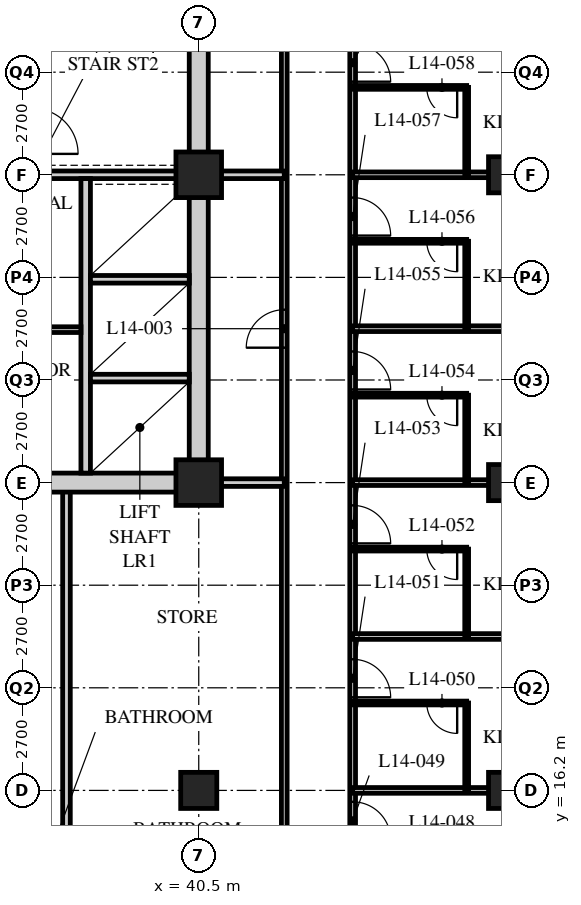
"""IFC4 building model, lengths in metres.
Left out: names, types, materials, properties, quantities, classifications, styles, units other than length and angle.
Written with IfcOpenShell. Run it as: python <this file> out.ifc"""

import sys

from ifc_helpers import new_model, si_unit, direction, frame, frame_2d, origin, origin_2d, place, context, subcontext, project, spatial, rectangle, hollow_rectangle, extrude, element, fill, save


model = new_model("IFC4")
c1 = context("Model", 3, precision=1e-05, world=origin(), true_north=direction((0.0, 1.0)))
c2 = subcontext(c1, "Body", "Model", "MODEL_VIEW")
j1 = project(units=[si_unit("LENGTHUNIT", "METRE"), si_unit("PLANEANGLEUNIT", "RADIAN")], contexts=[c1])
p1 = place(None, origin())
s1 = spatial("IfcSite", under=j1, at=p1, CompositionType="ELEMENT")
p2 = place(p1, origin())
s2 = spatial("IfcBuilding", under=s1, at=p2, CompositionType="ELEMENT")
p3 = place(p2, frame((0.0, 0.0, 60.2)))
s3 = spatial("IfcBuildingStorey", under=s2, at=p3, CompositionType="ELEMENT", Elevation=60.2)
p4 = place(p3, frame((40.5, 16.2, 0.0), z_axis=(0.0, 0.0, 1.0), x_axis=(1.0, 0.0, 0.0)))
e1 = element("IfcColumn", 1, at=p4, inside=s3, PredefinedType="COLUMN", context=c2, shape_type="SweptSolid", body=[
    extrude(hollow_rectangle(XDim=0.95, YDim=0.95, WallThickness=0.095, at=origin_2d()), origin(), (0.0, 0.0, 1.0), 3.4),
])
for number, where, z_axis, x_axis in (
    (2, (40.5, 24.3, 0.0), (0.0, 0.0, 1.0), (1.0, 0.0, 0.0)),
    (3, (40.5, 32.4, 0.0), (0.0, 0.0, 1.0), (1.0, 0.0, 0.0)),
):
    element("IfcColumn", number, at=place(p3, frame(where, z_axis=z_axis, x_axis=x_axis)), inside=s3, PredefinedType="COLUMN", context=c2, shape_type="SweptSolid", body=[
        extrude(hollow_rectangle(XDim=1.2, YDim=1.2, WallThickness=0.12, at=origin_2d()), origin(), (0.0, 0.0, 1.0), 3.4),
    ])
for number, where, z_axis, x_axis in (
    (4, (48.6, 16.2, 0.0), (0.0, 0.0, 1.0), (1.0, 0.0, 0.0)),
    (5, (48.6, 24.3, 0.0), (0.0, 0.0, 1.0), (1.0, 0.0, 0.0)),
    (6, (48.6, 32.4, 0.0), (0.0, 0.0, 1.0), (1.0, 0.0, 0.0)),
):
    element("IfcColumn", number, at=place(p3, frame(where, z_axis=z_axis, x_axis=x_axis)), inside=s3, PredefinedType="COLUMN", context=c2, shape_type="SweptSolid", body=[
        extrude(hollow_rectangle(XDim=0.95, YDim=0.95, WallThickness=0.095, at=origin_2d()), origin(), (0.0, 0.0, 1.0), 3.4),
    ])
p5 = place(p3, frame((44.55, 12.15, 0.0), z_axis=(0.0, 0.0, 1.0), x_axis=(0.0, 1.0, 0.0)))
e7 = element("IfcWall", 7, at=p5, inside=s3, PredefinedType="PARTITIONING", context=c2, shape_type="SweptSolid", body=[
    extrude(rectangle(XDim=30.15, YDim=0.15, at=frame_2d((15.075, 0.0))), origin(), (0.0, 0.0, 1.0), 3.19),
])
p6 = place(p5, frame((2.75, 0.0, 0.0)))
e8 = element("IfcOpeningElement", 8, at=p6, cuts=e7, PredefinedType="OPENING", context=c2, shape_type="SweptSolid", body=[
    extrude(rectangle(XDim=1.0, YDim=2.1, at=frame_2d((0.5, 1.05))), frame((0.0, 0.085, 0.0), z_axis=(0.0, -1.0, 0.0), x_axis=(1.0, 0.0, 0.0)), (0.0, 0.0, 1.0), 0.17),
])
p7 = place(p5, frame((6.5, 0.0, 0.0)))
e9 = element("IfcOpeningElement", 9, at=p7, cuts=e7, PredefinedType="OPENING", context=c2, shape_type="SweptSolid", body=[
    extrude(rectangle(XDim=1.0, YDim=2.1, at=frame_2d((0.5, 1.05))), frame((0.0, 0.085, 0.0), z_axis=(0.0, -1.0, 0.0), x_axis=(1.0, 0.0, 0.0)), (0.0, 0.0, 1.0), 0.17),
])
p8 = place(p5, frame((10.55, 0.0, 0.0)))
e10 = element("IfcOpeningElement", 10, at=p8, cuts=e7, PredefinedType="OPENING", context=c2, shape_type="SweptSolid", body=[
    extrude(rectangle(XDim=1.0, YDim=2.1, at=frame_2d((0.5, 1.05))), frame((0.0, 0.085, 0.0), z_axis=(0.0, -1.0, 0.0), x_axis=(1.0, 0.0, 0.0)), (0.0, 0.0, 1.0), 0.17),
])
p9 = place(p5, frame((14.6, 0.0, 0.0)))
e11 = element("IfcOpeningElement", 11, at=p9, cuts=e7, PredefinedType="OPENING", context=c2, shape_type="SweptSolid", body=[
    extrude(rectangle(XDim=1.0, YDim=2.1, at=frame_2d((0.5, 1.05))), frame((0.0, 0.085, 0.0), z_axis=(0.0, -1.0, 0.0), x_axis=(1.0, 0.0, 0.0)), (0.0, 0.0, 1.0), 0.17),
])
p10 = place(p5, frame((18.65, 0.0, 0.0)))
e12 = element("IfcOpeningElement", 12, at=p10, cuts=e7, PredefinedType="OPENING", context=c2, shape_type="SweptSolid", body=[
    extrude(rectangle(XDim=1.0, YDim=2.1, at=frame_2d((0.5, 1.05))), frame((0.0, 0.085, 0.0), z_axis=(0.0, -1.0, 0.0), x_axis=(1.0, 0.0, 0.0)), (0.0, 0.0, 1.0), 0.17),
])
p11 = place(p5, frame((22.7, 0.0, 0.0)))
e13 = element("IfcOpeningElement", 13, at=p11, cuts=e7, PredefinedType="OPENING", context=c2, shape_type="SweptSolid", body=[
    extrude(rectangle(XDim=1.0, YDim=2.1, at=frame_2d((0.5, 1.05))), frame((0.0, 0.085, 0.0), z_axis=(0.0, -1.0, 0.0), x_axis=(1.0, 0.0, 0.0)), (0.0, 0.0, 1.0), 0.17),
])
p12 = place(p5, frame((26.7, 0.0, 0.0)))
e14 = element("IfcOpeningElement", 14, at=p12, cuts=e7, PredefinedType="OPENING", context=c2, shape_type="SweptSolid", body=[
    extrude(rectangle(XDim=1.0, YDim=2.1, at=frame_2d((0.5, 1.05))), frame((0.0, 0.085, 0.0), z_axis=(0.0, -1.0, 0.0), x_axis=(1.0, 0.0, 0.0)), (0.0, 0.0, 1.0), 0.17),
])
p13 = place(p3, frame((42.75, 13.95, 0.0), z_axis=(0.0, 0.0, 1.0), x_axis=(0.0, 1.0, 0.0)))
e15 = element("IfcWall", 15, at=p13, inside=s3, PredefinedType="PARTITIONING", context=c2, shape_type="SweptSolid", body=[
    extrude(rectangle(XDim=26.55, YDim=0.15, at=frame_2d((13.275, 0.0))), origin(), (0.0, 0.0, 1.0), 3.19),
])
p14 = place(p13, frame((13.9, 0.0, 0.0)))
e16 = element("IfcOpeningElement", 16, at=p14, cuts=e15, PredefinedType="OPENING", context=c2, shape_type="SweptSolid", body=[
    extrude(rectangle(XDim=1.0, YDim=2.1, at=frame_2d((0.5, 1.05))), frame((0.0, 0.085, 0.0), z_axis=(0.0, -1.0, 0.0), x_axis=(1.0, 0.0, 0.0)), (0.0, 0.0, 1.0), 0.17),
])
p15 = place(p13, frame((22.0, 0.0, 0.0)))
e17 = element("IfcOpeningElement", 17, at=p15, cuts=e15, PredefinedType="OPENING", context=c2, shape_type="SweptSolid", body=[
    extrude(rectangle(XDim=1.0, YDim=2.1, at=frame_2d((0.5, 1.05))), frame((0.0, 0.085, 0.0), z_axis=(0.0, -1.0, 0.0), x_axis=(1.0, 0.0, 0.0)), (0.0, 0.0, 1.0), 0.17),
])
p16 = place(p3, frame((40.5, 32.4, 0.0), z_axis=(0.0, 0.0, 1.0), x_axis=(1.0, 0.0, 0.0)))
e18 = element("IfcWall", 18, at=p16, inside=s3, PredefinedType="SOLIDWALL", context=c2, shape_type="SweptSolid", body=[
    extrude(rectangle(XDim=2.25, YDim=0.2, at=frame_2d((1.125, 0.0))), origin(), (0.0, 0.0, 1.0), 2.578),
])
p17 = place(p3, frame((37.02, 13.95, 0.0), z_axis=(0.0, 0.0, 1.0), x_axis=(0.0, 1.0, 0.0)))
e19 = element("IfcWall", 19, at=p17, inside=s3, PredefinedType="SOLIDWALL", context=c2, shape_type="SweptSolid", body=[
    extrude(rectangle(XDim=10.35, YDim=0.2, at=frame_2d((5.175, 0.0))), origin(), (0.0, 0.0, 1.0), 3.19),
])
p18 = place(p3, frame((40.5, 24.3, 0.0), z_axis=(0.0, 0.0, 1.0), x_axis=(1.0, 0.0, 0.0)))
e20 = element("IfcWall", 20, at=p18, inside=s3, PredefinedType="SOLIDWALL", context=c2, shape_type="SweptSolid", body=[
    extrude(rectangle(XDim=2.25, YDim=0.2, at=frame_2d((1.125, 0.0))), origin(), (0.0, 0.0, 1.0), 2.578),
])
p19 = place(p3, frame((44.55, 16.2, 0.0), z_axis=(0.0, 0.0, 1.0), x_axis=(1.0, 0.0, 0.0)))
e21 = element("IfcWall", 21, at=p19, inside=s3, PredefinedType="PARTITIONING", context=c2, shape_type="SweptSolid", body=[
    extrude(rectangle(XDim=11.85, YDim=0.15, at=frame_2d((5.925, 0.0))), origin(), (0.0, 0.0, 1.0), 2.578),
])
p20 = place(p3, frame((47.55, 16.2, 0.0), z_axis=(0.0, 0.0, 1.0), x_axis=(0.0, 1.0, 0.0)))
e22 = element("IfcWall", 22, at=p20, inside=s3, PredefinedType="PARTITIONING", context=c2, shape_type="SweptSolid", body=[
    extrude(rectangle(XDim=2.3, YDim=0.1, at=frame_2d((1.15, 0.0))), origin(), (0.0, 0.0, 1.0), 3.19),
])
p21 = place(p3, frame((44.55, 18.5, 0.0), z_axis=(0.0, 0.0, 1.0), x_axis=(1.0, 0.0, 0.0)))
e23 = element("IfcWall", 23, at=p21, inside=s3, PredefinedType="PARTITIONING", context=c2, shape_type="SweptSolid", body=[
    extrude(rectangle(XDim=3.0, YDim=0.1, at=frame_2d((1.5, 0.0))), origin(), (0.0, 0.0, 1.0), 3.19),
])
p22 = place(p21, frame((1.95, 0.0, 0.0)))
e24 = element("IfcOpeningElement", 24, at=p22, cuts=e23, PredefinedType="OPENING", context=c2, shape_type="SweptSolid", body=[
    extrude(rectangle(XDim=0.8, YDim=2.1, at=frame_2d((0.4, 1.05))), frame((0.0, 0.06, 0.0), z_axis=(0.0, -1.0, 0.0), x_axis=(1.0, 0.0, 0.0)), (0.0, 0.0, 1.0), 0.12),
])
p23 = place(p3, frame((44.55, 20.25, 0.0), z_axis=(0.0, 0.0, 1.0), x_axis=(1.0, 0.0, 0.0)))
e25 = element("IfcWall", 25, at=p23, inside=s3, PredefinedType="PARTITIONING", context=c2, shape_type="SweptSolid", body=[
    extrude(rectangle(XDim=11.85, YDim=0.15, at=frame_2d((5.925, 0.0))), origin(), (0.0, 0.0, 1.0), 3.19),
])
p24 = place(p3, frame((47.55, 20.25, 0.0), z_axis=(0.0, 0.0, 1.0), x_axis=(0.0, 1.0, 0.0)))
e26 = element("IfcWall", 26, at=p24, inside=s3, PredefinedType="PARTITIONING", context=c2, shape_type="SweptSolid", body=[
    extrude(rectangle(XDim=2.3, YDim=0.1, at=frame_2d((1.15, 0.0))), origin(), (0.0, 0.0, 1.0), 3.19),
])
p25 = place(p3, frame((44.55, 22.55, 0.0), z_axis=(0.0, 0.0, 1.0), x_axis=(1.0, 0.0, 0.0)))
e27 = element("IfcWall", 27, at=p25, inside=s3, PredefinedType="PARTITIONING", context=c2, shape_type="SweptSolid", body=[
    extrude(rectangle(XDim=3.0, YDim=0.1, at=frame_2d((1.5, 0.0))), origin(), (0.0, 0.0, 1.0), 3.19),
])
p26 = place(p25, frame((1.95, 0.0, 0.0)))
e28 = element("IfcOpeningElement", 28, at=p26, cuts=e27, PredefinedType="OPENING", context=c2, shape_type="SweptSolid", body=[
    extrude(rectangle(XDim=0.8, YDim=2.1, at=frame_2d((0.4, 1.05))), frame((0.0, 0.06, 0.0), z_axis=(0.0, -1.0, 0.0), x_axis=(1.0, 0.0, 0.0)), (0.0, 0.0, 1.0), 0.12),
])
p27 = place(p3, frame((44.55, 24.3, 0.0), z_axis=(0.0, 0.0, 1.0), x_axis=(1.0, 0.0, 0.0)))
e29 = element("IfcWall", 29, at=p27, inside=s3, PredefinedType="PARTITIONING", context=c2, shape_type="SweptSolid", body=[
    extrude(rectangle(XDim=11.85, YDim=0.15, at=frame_2d((5.925, 0.0))), origin(), (0.0, 0.0, 1.0), 2.578),
])
p28 = place(p3, frame((47.55, 24.3, 0.0), z_axis=(0.0, 0.0, 1.0), x_axis=(0.0, 1.0, 0.0)))
e30 = element("IfcWall", 30, at=p28, inside=s3, PredefinedType="PARTITIONING", context=c2, shape_type="SweptSolid", body=[
    extrude(rectangle(XDim=2.3, YDim=0.1, at=frame_2d((1.15, 0.0))), origin(), (0.0, 0.0, 1.0), 3.19),
])
p29 = place(p3, frame((44.55, 26.6, 0.0), z_axis=(0.0, 0.0, 1.0), x_axis=(1.0, 0.0, 0.0)))
e31 = element("IfcWall", 31, at=p29, inside=s3, PredefinedType="PARTITIONING", context=c2, shape_type="SweptSolid", body=[
    extrude(rectangle(XDim=3.0, YDim=0.1, at=frame_2d((1.5, 0.0))), origin(), (0.0, 0.0, 1.0), 3.19),
])
p30 = place(p29, frame((1.95, 0.0, 0.0)))
e32 = element("IfcOpeningElement", 32, at=p30, cuts=e31, PredefinedType="OPENING", context=c2, shape_type="SweptSolid", body=[
    extrude(rectangle(XDim=0.8, YDim=2.1, at=frame_2d((0.4, 1.05))), frame((0.0, 0.06, 0.0), z_axis=(0.0, -1.0, 0.0), x_axis=(1.0, 0.0, 0.0)), (0.0, 0.0, 1.0), 0.12),
])
p31 = place(p3, frame((44.55, 28.35, 0.0), z_axis=(0.0, 0.0, 1.0), x_axis=(1.0, 0.0, 0.0)))
e33 = element("IfcWall", 33, at=p31, inside=s3, PredefinedType="PARTITIONING", context=c2, shape_type="SweptSolid", body=[
    extrude(rectangle(XDim=11.85, YDim=0.15, at=frame_2d((5.925, 0.0))), origin(), (0.0, 0.0, 1.0), 3.19),
])
p32 = place(p3, frame((47.55, 28.35, 0.0), z_axis=(0.0, 0.0, 1.0), x_axis=(0.0, 1.0, 0.0)))
e34 = element("IfcWall", 34, at=p32, inside=s3, PredefinedType="PARTITIONING", context=c2, shape_type="SweptSolid", body=[
    extrude(rectangle(XDim=2.3, YDim=0.1, at=frame_2d((1.15, 0.0))), origin(), (0.0, 0.0, 1.0), 3.19),
])
p33 = place(p3, frame((44.55, 30.65, 0.0), z_axis=(0.0, 0.0, 1.0), x_axis=(1.0, 0.0, 0.0)))
e35 = element("IfcWall", 35, at=p33, inside=s3, PredefinedType="PARTITIONING", context=c2, shape_type="SweptSolid", body=[
    extrude(rectangle(XDim=3.0, YDim=0.1, at=frame_2d((1.5, 0.0))), origin(), (0.0, 0.0, 1.0), 3.19),
])
p34 = place(p33, frame((1.95, 0.0, 0.0)))
e36 = element("IfcOpeningElement", 36, at=p34, cuts=e35, PredefinedType="OPENING", context=c2, shape_type="SweptSolid", body=[
    extrude(rectangle(XDim=0.8, YDim=2.1, at=frame_2d((0.4, 1.05))), frame((0.0, 0.06, 0.0), z_axis=(0.0, -1.0, 0.0), x_axis=(1.0, 0.0, 0.0)), (0.0, 0.0, 1.0), 0.12),
])
p35 = place(p3, frame((44.55, 32.4, 0.0), z_axis=(0.0, 0.0, 1.0), x_axis=(1.0, 0.0, 0.0)))
e37 = element("IfcWall", 37, at=p35, inside=s3, PredefinedType="PARTITIONING", context=c2, shape_type="SweptSolid", body=[
    extrude(rectangle(XDim=11.85, YDim=0.15, at=frame_2d((5.925, 0.0))), origin(), (0.0, 0.0, 1.0), 2.578),
])
p36 = place(p3, frame((47.55, 32.4, 0.0), z_axis=(0.0, 0.0, 1.0), x_axis=(0.0, 1.0, 0.0)))
e38 = element("IfcWall", 38, at=p36, inside=s3, PredefinedType="PARTITIONING", context=c2, shape_type="SweptSolid", body=[
    extrude(rectangle(XDim=2.3, YDim=0.1, at=frame_2d((1.15, 0.0))), origin(), (0.0, 0.0, 1.0), 3.19),
])
p37 = place(p3, frame((44.55, 34.7, 0.0), z_axis=(0.0, 0.0, 1.0), x_axis=(1.0, 0.0, 0.0)))
e39 = element("IfcWall", 39, at=p37, inside=s3, PredefinedType="PARTITIONING", context=c2, shape_type="SweptSolid", body=[
    extrude(rectangle(XDim=3.0, YDim=0.1, at=frame_2d((1.5, 0.0))), origin(), (0.0, 0.0, 1.0), 3.19),
])
p38 = place(p37, frame((1.95, 0.0, 0.0)))
e40 = element("IfcOpeningElement", 40, at=p38, cuts=e39, PredefinedType="OPENING", context=c2, shape_type="SweptSolid", body=[
    extrude(rectangle(XDim=0.8, YDim=2.1, at=frame_2d((0.4, 1.05))), frame((0.0, 0.06, 0.0), z_axis=(0.0, -1.0, 0.0), x_axis=(1.0, 0.0, 0.0)), (0.0, 0.0, 1.0), 0.12),
])
p39 = place(p3, frame((15.95, 24.3, 0.0), z_axis=(0.0, 0.0, 1.0), x_axis=(1.0, 0.0, 0.0)))
e41 = element("IfcWall", 41, at=p39, inside=s3, PredefinedType="SOLIDWALL", context=c2, shape_type="SweptSolid", body=[
    extrude(rectangle(XDim=24.8, YDim=0.5, at=frame_2d((12.4, 0.0))), origin(), (0.0, 0.0, 1.0), 2.54),
])
p40 = place(p39, frame((11.5, 0.0, 0.0)))
e42 = element("IfcOpeningElement", 42, at=p40, cuts=e41, PredefinedType="OPENING", context=c2, shape_type="SweptSolid", body=[
    extrude(rectangle(XDim=1.8, YDim=2.4, at=frame_2d((0.9, 1.2))), frame((0.0, 0.26, 0.0), z_axis=(0.0, -1.0, 0.0), x_axis=(1.0, 0.0, 0.0)), (0.0, 0.0, 1.0), 0.52),
])
p41 = place(p3, frame((40.5, 24.55, 0.0), z_axis=(0.0, 0.0, 1.0), x_axis=(0.0, 1.0, 0.0)))
e43 = element("IfcWall", 43, at=p41, inside=s3, PredefinedType="SOLIDWALL", context=c2, shape_type="SweptSolid", body=[
    extrude(rectangle(XDim=15.7, YDim=0.5, at=frame_2d((7.85, 0.0))), origin(), (0.0, 0.0, 1.0), 2.578),
])
p42 = place(p3, frame((32.3, 32.4, 0.0), z_axis=(0.0, 0.0, 1.0), x_axis=(1.0, 0.0, 0.0)))
e44 = element("IfcWall", 44, at=p42, inside=s3, PredefinedType="SOLIDWALL", context=c2, shape_type="SweptSolid", body=[
    extrude(rectangle(XDim=7.95, YDim=0.2, at=frame_2d((3.975, 0.0))), origin(), (0.0, 0.0, 1.0), 2.578),
])
p43 = place(p3, frame((37.525, 24.55, 0.0), z_axis=(0.0, 0.0, 1.0), x_axis=(0.0, 1.0, 0.0)))
e45 = element("IfcWall", 45, at=p43, inside=s3, PredefinedType="SOLIDWALL", context=c2, shape_type="SweptSolid", body=[
    extrude(rectangle(XDim=7.75, YDim=0.25, at=frame_2d((3.875, 0.0))), origin(), (0.0, 0.0, 1.0), 3.19),
])
for number, where, z_axis, x_axis in (
    (46, (37.65, 27.05, 0.0), (0.0, 0.0, 1.0), (1.0, 0.0, 0.0)),
    (47, (37.65, 29.65, 0.0), (0.0, 0.0, 1.0), (1.0, 0.0, 0.0)),
):
    element("IfcWall", number, at=place(p3, frame(where, z_axis=z_axis, x_axis=x_axis)), inside=s3, PredefinedType="SOLIDWALL", context=c2, shape_type="SweptSolid", body=[
        extrude(rectangle(XDim=2.6, YDim=0.2, at=frame_2d((1.3, 0.0))), origin(), (0.0, 0.0, 1.0), 3.19),
    ])
p44 = place(p3, frame((32.5, 28.325, 0.0), z_axis=(0.0, 0.0, 1.0), x_axis=(1.0, 0.0, 0.0)))
e48 = element("IfcWall", 48, at=p44, inside=s3, PredefinedType="PARTITIONING", context=c2, shape_type="SweptSolid", body=[
    extrude(rectangle(XDim=4.9, YDim=0.15, at=frame_2d((2.45, 0.0))), origin(), (0.0, 0.0, 1.0), 3.19),
])
p45 = place(p14, origin())
e49 = element("IfcDoor", 49, at=p45, inside=s3, OperationType="SINGLE_SWING_LEFT", PredefinedType="DOOR", context=c2, shape_type="SweptSolid", body=[
    extrude(rectangle(XDim=1.0, YDim=2.1, at=frame_2d((0.5, 1.05))), frame((0.0, 0.025, 0.0), z_axis=(0.0, -1.0, 0.0), x_axis=(1.0, 0.0, 0.0)), (0.0, 0.0, 1.0), 0.05),
])
fill(e16, e49)
p46 = place(p6, origin())
e50 = element("IfcDoor", 50, at=p46, inside=s3, OperationType="SINGLE_SWING_RIGHT", PredefinedType="DOOR", context=c2, shape_type="SweptSolid", body=[
    extrude(rectangle(XDim=1.0, YDim=2.1, at=frame_2d((0.5, 1.05))), frame((0.0, 0.025, 0.0), z_axis=(0.0, -1.0, 0.0), x_axis=(1.0, 0.0, 0.0)), (0.0, 0.0, 1.0), 0.05),
])
fill(e8, e50)
p47 = place(p22, origin())
e51 = element("IfcDoor", 51, at=p47, inside=s3, OperationType="SINGLE_SWING_LEFT", PredefinedType="DOOR", context=c2, shape_type="SweptSolid", body=[
    extrude(rectangle(XDim=0.8, YDim=2.1, at=frame_2d((0.4, 1.05))), frame((0.0, 0.025, 0.0), z_axis=(0.0, -1.0, 0.0), x_axis=(1.0, 0.0, 0.0)), (0.0, 0.0, 1.0), 0.05),
])
fill(e24, e51)
p48 = place(p7, origin())
e52 = element("IfcDoor", 52, at=p48, inside=s3, OperationType="SINGLE_SWING_RIGHT", PredefinedType="DOOR", context=c2, shape_type="SweptSolid", body=[
    extrude(rectangle(XDim=1.0, YDim=2.1, at=frame_2d((0.5, 1.05))), frame((0.0, 0.025, 0.0), z_axis=(0.0, -1.0, 0.0), x_axis=(1.0, 0.0, 0.0)), (0.0, 0.0, 1.0), 0.05),
])
fill(e9, e52)
p49 = place(p26, origin())
e53 = element("IfcDoor", 53, at=p49, inside=s3, OperationType="SINGLE_SWING_LEFT", PredefinedType="DOOR", context=c2, shape_type="SweptSolid", body=[
    extrude(rectangle(XDim=0.8, YDim=2.1, at=frame_2d((0.4, 1.05))), frame((0.0, 0.025, 0.0), z_axis=(0.0, -1.0, 0.0), x_axis=(1.0, 0.0, 0.0)), (0.0, 0.0, 1.0), 0.05),
])
fill(e28, e53)
p50 = place(p8, origin())
e54 = element("IfcDoor", 54, at=p50, inside=s3, OperationType="SINGLE_SWING_RIGHT", PredefinedType="DOOR", context=c2, shape_type="SweptSolid", body=[
    extrude(rectangle(XDim=1.0, YDim=2.1, at=frame_2d((0.5, 1.05))), frame((0.0, 0.025, 0.0), z_axis=(0.0, -1.0, 0.0), x_axis=(1.0, 0.0, 0.0)), (0.0, 0.0, 1.0), 0.05),
])
fill(e10, e54)
p51 = place(p30, origin())
e55 = element("IfcDoor", 55, at=p51, inside=s3, OperationType="SINGLE_SWING_LEFT", PredefinedType="DOOR", context=c2, shape_type="SweptSolid", body=[
    extrude(rectangle(XDim=0.8, YDim=2.1, at=frame_2d((0.4, 1.05))), frame((0.0, 0.025, 0.0), z_axis=(0.0, -1.0, 0.0), x_axis=(1.0, 0.0, 0.0)), (0.0, 0.0, 1.0), 0.05),
])
fill(e32, e55)
p52 = place(p9, origin())
e56 = element("IfcDoor", 56, at=p52, inside=s3, OperationType="SINGLE_SWING_RIGHT", PredefinedType="DOOR", context=c2, shape_type="SweptSolid", body=[
    extrude(rectangle(XDim=1.0, YDim=2.1, at=frame_2d((0.5, 1.05))), frame((0.0, 0.025, 0.0), z_axis=(0.0, -1.0, 0.0), x_axis=(1.0, 0.0, 0.0)), (0.0, 0.0, 1.0), 0.05),
])
fill(e11, e56)
p53 = place(p34, origin())
e57 = element("IfcDoor", 57, at=p53, inside=s3, OperationType="SINGLE_SWING_LEFT", PredefinedType="DOOR", context=c2, shape_type="SweptSolid", body=[
    extrude(rectangle(XDim=0.8, YDim=2.1, at=frame_2d((0.4, 1.05))), frame((0.0, 0.025, 0.0), z_axis=(0.0, -1.0, 0.0), x_axis=(1.0, 0.0, 0.0)), (0.0, 0.0, 1.0), 0.05),
])
fill(e36, e57)
p54 = place(p10, origin())
e58 = element("IfcDoor", 58, at=p54, inside=s3, OperationType="SINGLE_SWING_RIGHT", PredefinedType="DOOR", context=c2, shape_type="SweptSolid", body=[
    extrude(rectangle(XDim=1.0, YDim=2.1, at=frame_2d((0.5, 1.05))), frame((0.0, 0.025, 0.0), z_axis=(0.0, -1.0, 0.0), x_axis=(1.0, 0.0, 0.0)), (0.0, 0.0, 1.0), 0.05),
])
fill(e12, e58)
p55 = place(p38, origin())
e59 = element("IfcDoor", 59, at=p55, inside=s3, OperationType="SINGLE_SWING_LEFT", PredefinedType="DOOR", context=c2, shape_type="SweptSolid", body=[
    extrude(rectangle(XDim=0.8, YDim=2.1, at=frame_2d((0.4, 1.05))), frame((0.0, 0.025, 0.0), z_axis=(0.0, -1.0, 0.0), x_axis=(1.0, 0.0, 0.0)), (0.0, 0.0, 1.0), 0.05),
])
fill(e40, e59)
p56 = place(p11, origin())
e60 = element("IfcDoor", 60, at=p56, inside=s3, OperationType="SINGLE_SWING_RIGHT", PredefinedType="DOOR", context=c2, shape_type="SweptSolid", body=[
    extrude(rectangle(XDim=1.0, YDim=2.1, at=frame_2d((0.5, 1.05))), frame((0.0, 0.025, 0.0), z_axis=(0.0, -1.0, 0.0), x_axis=(1.0, 0.0, 0.0)), (0.0, 0.0, 1.0), 0.05),
])
fill(e13, e60)
save(model, sys.argv[1])
